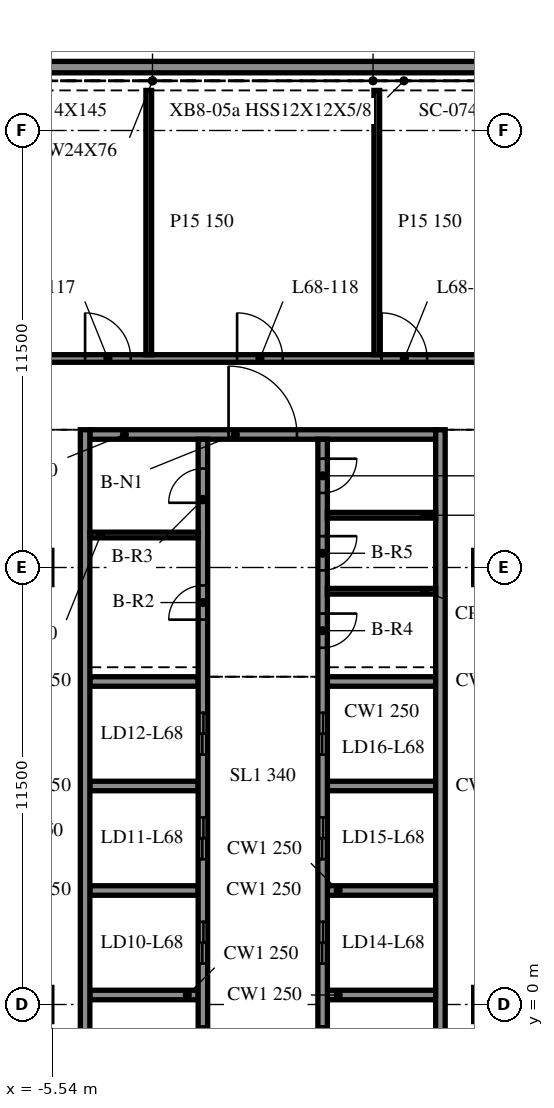
"""IFC4 building model, lengths in metres.
Left out: names, types, materials, properties, quantities, classifications, styles, units other than length and angle.
Written with IfcOpenShell. Run it as: python <this file> out.ifc"""

import sys

from ifc_helpers import new_model, si_unit, direction, frame, frame_2d, origin, place, context, subcontext, project, spatial, rectangle, extrude, element, fill, save


model = new_model("IFC4")
c1 = context("Model", 3, precision=1e-05, world=origin(), true_north=direction((0.0, 1.0)))
c2 = subcontext(c1, "Body", "Model", "MODEL_VIEW")
j1 = project(units=[si_unit("LENGTHUNIT", "METRE"), si_unit("PLANEANGLEUNIT", "RADIAN")], contexts=[c1])
p1 = place(None, origin())
s1 = spatial("IfcSite", under=j1, at=p1, CompositionType="ELEMENT")
p2 = place(p1, origin())
s2 = spatial("IfcBuilding", under=s1, at=p2, CompositionType="ELEMENT")
p3 = place(p2, frame((0.0, 0.0, 278.5)))
s3 = spatial("IfcBuildingStorey", under=s2, at=p3, CompositionType="ELEMENT", Elevation=278.5)
p4 = place(p3, frame((42.0, 24.668, 0.0), z_axis=(0.0, 0.0, 1.0), x_axis=(-1.0, 0.0, 0.0)))
e1 = element("IfcWall", 1, at=p4, inside=s3, PredefinedType="NOTDEFINED", context=c2, shape_type="SweptSolid", body=[
    extrude(rectangle(XDim=84.0, YDim=0.3, at=frame_2d((42.0, 0.0))), origin(), (0.0, 0.0, 1.0), 2.853),
])
for number, where, z_axis, x_axis in (
    (2, (-4.675, 15.125, 0.0), (0.0, 0.0, 1.0), (0.0, -1.0, 0.0)),
    (3, (4.675, -9.125, 0.0), (0.0, 0.0, 1.0), (0.0, 1.0, 0.0)),
):
    element("IfcWall", number, at=place(p3, frame(where, z_axis=z_axis, x_axis=x_axis)), inside=s3, PredefinedType="SOLIDWALL", context=c2, shape_type="SweptSolid", body=[
        extrude(rectangle(XDim=24.25, YDim=0.25, at=frame_2d((12.125, 0.0))), origin(), (0.0, 0.0, 1.0), 3.46),
    ])
p5 = place(p3, frame((-4.55, 15.0, 0.0), z_axis=(0.0, 0.0, 1.0), x_axis=(1.0, 0.0, 0.0)))
e4 = element("IfcWall", 4, at=p5, inside=s3, PredefinedType="SOLIDWALL", context=c2, shape_type="SweptSolid", body=[
    extrude(rectangle(XDim=9.1, YDim=0.25, at=frame_2d((4.55, 0.0))), origin(), (0.0, 0.0, 1.0), 3.46),
])
p6 = place(p5, frame((3.65, 0.0, 0.0)))
e5 = element("IfcOpeningElement", 5, at=p6, cuts=e4, PredefinedType="OPENING", context=c2, shape_type="SweptSolid", body=[
    extrude(rectangle(XDim=1.8, YDim=2.1, at=frame_2d((0.9, 1.05))), frame((0.0, 0.135, 0.0), z_axis=(0.0, -1.0, 0.0), x_axis=(1.0, 0.0, 0.0)), (0.0, 0.0, 1.0), 0.27),
])
p7 = place(p3, frame((-1.575, -8.875, 0.0), z_axis=(0.0, 0.0, 1.0), x_axis=(0.0, 1.0, 0.0)))
e6 = element("IfcWall", 6, at=p7, inside=s3, PredefinedType="SOLIDWALL", context=c2, shape_type="SweptSolid", body=[
    extrude(rectangle(XDim=23.75, YDim=0.25, at=frame_2d((11.875, 0.0))), origin(), (0.0, 0.0, 1.0), 3.46),
])
p8 = place(p7, frame((7.2, 0.0, 0.0)))
e7 = element("IfcOpeningElement", 7, at=p8, cuts=e6, PredefinedType="OPENING", context=c2, shape_type="SweptSolid", body=[
    extrude(rectangle(XDim=1.1, YDim=2.1, at=frame_2d((0.55, 1.05))), frame((0.0, 0.135, 0.0), z_axis=(0.0, -1.0, 0.0), x_axis=(1.0, 0.0, 0.0)), (0.0, 0.0, 1.0), 0.27),
])
p9 = place(p7, frame((9.95, 0.0, 0.0)))
e8 = element("IfcOpeningElement", 8, at=p9, cuts=e6, PredefinedType="OPENING", context=c2, shape_type="SweptSolid", body=[
    extrude(rectangle(XDim=1.1, YDim=2.1, at=frame_2d((0.55, 1.05))), frame((0.0, 0.135, 0.0), z_axis=(0.0, -1.0, 0.0), x_axis=(1.0, 0.0, 0.0)), (0.0, 0.0, 1.0), 0.27),
])
p10 = place(p7, frame((12.7, 0.0, 0.0)))
e9 = element("IfcOpeningElement", 9, at=p10, cuts=e6, PredefinedType="OPENING", context=c2, shape_type="SweptSolid", body=[
    extrude(rectangle(XDim=1.1, YDim=2.1, at=frame_2d((0.55, 1.05))), frame((0.0, 0.135, 0.0), z_axis=(0.0, -1.0, 0.0), x_axis=(1.0, 0.0, 0.0)), (0.0, 0.0, 1.0), 0.27),
])
p11 = place(p7, frame((15.45, 0.0, 0.0)))
e10 = element("IfcOpeningElement", 10, at=p11, cuts=e6, PredefinedType="OPENING", context=c2, shape_type="SweptSolid", body=[
    extrude(rectangle(XDim=1.1, YDim=2.1, at=frame_2d((0.55, 1.05))), frame((0.0, 0.135, 0.0), z_axis=(0.0, -1.0, 0.0), x_axis=(1.0, 0.0, 0.0)), (0.0, 0.0, 1.0), 0.27),
])
p12 = place(p7, frame((2.55, 0.0, 0.0)))
e11 = element("IfcOpeningElement", 11, at=p12, cuts=e6, PredefinedType="OPENING", context=c2, shape_type="SweptSolid", body=[
    extrude(rectangle(XDim=0.9, YDim=2.1, at=frame_2d((0.45, 1.05))), frame((0.0, 0.135, 0.0), z_axis=(0.0, -1.0, 0.0), x_axis=(1.0, 0.0, 0.0)), (0.0, 0.0, 1.0), 0.27),
])
p13 = place(p7, frame((19.002, 0.0, 0.0)))
e12 = element("IfcOpeningElement", 12, at=p13, cuts=e6, PredefinedType="OPENING", context=c2, shape_type="SweptSolid", body=[
    extrude(rectangle(XDim=0.9, YDim=2.1, at=frame_2d((0.45, 1.05))), frame((0.0, 0.135, 0.0), z_axis=(0.0, -1.0, 0.0), x_axis=(1.0, 0.0, 0.0)), (0.0, 0.0, 1.0), 0.27),
])
p14 = place(p7, frame((22.077, 0.0, 0.0)))
e13 = element("IfcOpeningElement", 13, at=p14, cuts=e6, PredefinedType="OPENING", context=c2, shape_type="SweptSolid", body=[
    extrude(rectangle(XDim=0.9, YDim=2.1, at=frame_2d((0.45, 1.05))), frame((0.0, 0.135, 0.0), z_axis=(0.0, -1.0, 0.0), x_axis=(1.0, 0.0, 0.0)), (0.0, 0.0, 1.0), 0.27),
])
p15 = place(p3, frame((1.575, 14.875, 0.0), z_axis=(0.0, 0.0, 1.0), x_axis=(0.0, -1.0, 0.0)))
e14 = element("IfcWall", 14, at=p15, inside=s3, PredefinedType="SOLIDWALL", context=c2, shape_type="SweptSolid", body=[
    extrude(rectangle(XDim=17.5, YDim=0.25, at=frame_2d((8.75, 0.0))), origin(), (0.0, 0.0, 1.0), 3.46),
])
p16 = place(p15, frame((15.45, 0.0, 0.0)))
e15 = element("IfcOpeningElement", 15, at=p16, cuts=e14, PredefinedType="OPENING", context=c2, shape_type="SweptSolid", body=[
    extrude(rectangle(XDim=1.1, YDim=2.1, at=frame_2d((0.55, 1.05))), frame((0.0, 0.135, 0.0), z_axis=(0.0, -1.0, 0.0), x_axis=(1.0, 0.0, 0.0)), (0.0, 0.0, 1.0), 0.27),
])
p17 = place(p15, frame((12.7, 0.0, 0.0)))
e16 = element("IfcOpeningElement", 16, at=p17, cuts=e14, PredefinedType="OPENING", context=c2, shape_type="SweptSolid", body=[
    extrude(rectangle(XDim=1.1, YDim=2.1, at=frame_2d((0.55, 1.05))), frame((0.0, 0.135, 0.0), z_axis=(0.0, -1.0, 0.0), x_axis=(1.0, 0.0, 0.0)), (0.0, 0.0, 1.0), 0.27),
])
p18 = place(p15, frame((9.95, 0.0, 0.0)))
e17 = element("IfcOpeningElement", 17, at=p18, cuts=e14, PredefinedType="OPENING", context=c2, shape_type="SweptSolid", body=[
    extrude(rectangle(XDim=1.1, YDim=2.1, at=frame_2d((0.55, 1.05))), frame((0.0, 0.135, 0.0), z_axis=(0.0, -1.0, 0.0), x_axis=(1.0, 0.0, 0.0)), (0.0, 0.0, 1.0), 0.27),
])
p19 = place(p15, frame((7.2, 0.0, 0.0)))
e18 = element("IfcOpeningElement", 18, at=p19, cuts=e14, PredefinedType="OPENING", context=c2, shape_type="SweptSolid", body=[
    extrude(rectangle(XDim=1.1, YDim=2.1, at=frame_2d((0.55, 1.05))), frame((0.0, 0.135, 0.0), z_axis=(0.0, -1.0, 0.0), x_axis=(1.0, 0.0, 0.0)), (0.0, 0.0, 1.0), 0.27),
])
p20 = place(p15, frame((4.587, 0.0, 0.0)))
e19 = element("IfcOpeningElement", 19, at=p20, cuts=e14, PredefinedType="OPENING", context=c2, shape_type="SweptSolid", body=[
    extrude(rectangle(XDim=0.9, YDim=2.1, at=frame_2d((0.45, 1.05))), frame((0.0, 0.135, 0.0), z_axis=(0.0, -1.0, 0.0), x_axis=(1.0, 0.0, 0.0)), (0.0, 0.0, 1.0), 0.27),
])
p21 = place(p15, frame((2.55, 0.0, 0.0)))
e20 = element("IfcOpeningElement", 20, at=p21, cuts=e14, PredefinedType="OPENING", context=c2, shape_type="SweptSolid", body=[
    extrude(rectangle(XDim=0.9, YDim=2.1, at=frame_2d((0.45, 1.05))), frame((0.0, 0.135, 0.0), z_axis=(0.0, -1.0, 0.0), x_axis=(1.0, 0.0, 0.0)), (0.0, 0.0, 1.0), 0.27),
])
p22 = place(p15, frame((0.512, 0.0, 0.0)))
e21 = element("IfcOpeningElement", 21, at=p22, cuts=e14, PredefinedType="OPENING", context=c2, shape_type="SweptSolid", body=[
    extrude(rectangle(XDim=0.9, YDim=2.1, at=frame_2d((0.45, 1.05))), frame((0.0, 0.135, 0.0), z_axis=(0.0, -1.0, 0.0), x_axis=(1.0, 0.0, 0.0)), (0.0, 0.0, 1.0), 0.27),
])
for number, where, z_axis, x_axis in (
    (22, (-4.55, 0.25, 0.0), (0.0, 0.0, 1.0), (1.0, 0.0, 0.0)),
    (23, (-4.55, 3.0, 0.0), (0.0, 0.0, 1.0), (1.0, 0.0, 0.0)),
    (24, (-4.55, 5.75, 0.0), (0.0, 0.0, 1.0), (1.0, 0.0, 0.0)),
    (25, (-4.55, 8.5, 0.0), (0.0, 0.0, 1.0), (1.0, 0.0, 0.0)),
    (26, (1.7, 0.25, 0.0), (0.0, 0.0, 1.0), (1.0, 0.0, 0.0)),
    (27, (1.7, 3.0, 0.0), (0.0, 0.0, 1.0), (1.0, 0.0, 0.0)),
    (28, (1.7, 5.75, 0.0), (0.0, 0.0, 1.0), (1.0, 0.0, 0.0)),
    (29, (1.7, 8.5, 0.0), (0.0, 0.0, 1.0), (1.0, 0.0, 0.0)),
):
    element("IfcWall", number, at=place(p3, frame(where, z_axis=z_axis, x_axis=x_axis)), inside=s3, PredefinedType="SOLIDWALL", context=c2, shape_type="SweptSolid", body=[
        extrude(rectangle(XDim=2.85, YDim=0.25, at=frame_2d((1.425, 0.0))), origin(), (0.0, 0.0, 1.0), 3.46),
    ])
for number, where, z_axis, x_axis in (
    (30, (-4.55, 12.355, 0.0), (0.0, 0.0, 1.0), (1.0, 0.0, 0.0)),
    (31, (1.7, 10.875, 0.0), (0.0, 0.0, 1.0), (1.0, 0.0, 0.0)),
    (32, (1.7, 12.875, 0.0), (0.0, 0.0, 1.0), (1.0, 0.0, 0.0)),
):
    element("IfcWall", number, at=place(p3, frame(where, z_axis=z_axis, x_axis=x_axis)), inside=s3, PredefinedType="PARTITIONING", context=c2, shape_type="SweptSolid", body=[
        extrude(rectangle(XDim=2.85, YDim=0.15, at=frame_2d((1.425, 0.0))), origin(), (0.0, 0.0, 1.0), 3.46),
    ])
p23 = place(p3, frame((-47.975, 17.0, 0.0), z_axis=(0.0, 0.0, 1.0), x_axis=(1.0, 0.0, 0.0)))
e33 = element("IfcWall", 33, at=p23, inside=s3, PredefinedType="PARTITIONING", context=c2, shape_type="SweptSolid", body=[
    extrude(rectangle(XDim=95.95, YDim=0.2, at=frame_2d((47.975, 0.0))), origin(), (0.0, 0.0, 1.0), 3.46),
])
p24 = place(p23, frame((7.3, 0.0, 0.0)))
e34 = element("IfcOpeningElement", 34, at=p24, cuts=e33, PredefinedType="OPENING", context=c2, shape_type="SweptSolid", body=[
    extrude(rectangle(XDim=1.2, YDim=2.1, at=frame_2d((0.6, 1.05))), frame((0.0, 0.11, 0.0), z_axis=(0.0, -1.0, 0.0), x_axis=(1.0, 0.0, 0.0)), (0.0, 0.0, 1.0), 0.22),
])
p25 = place(p23, frame((13.3, 0.0, 0.0)))
e35 = element("IfcOpeningElement", 35, at=p25, cuts=e33, PredefinedType="OPENING", context=c2, shape_type="SweptSolid", body=[
    extrude(rectangle(XDim=1.2, YDim=2.1, at=frame_2d((0.6, 1.05))), frame((0.0, 0.11, 0.0), z_axis=(0.0, -1.0, 0.0), x_axis=(1.0, 0.0, 0.0)), (0.0, 0.0, 1.0), 0.22),
])
p26 = place(p23, frame((19.3, 0.0, 0.0)))
e36 = element("IfcOpeningElement", 36, at=p26, cuts=e33, PredefinedType="OPENING", context=c2, shape_type="SweptSolid", body=[
    extrude(rectangle(XDim=1.2, YDim=2.1, at=frame_2d((0.6, 1.05))), frame((0.0, 0.11, 0.0), z_axis=(0.0, -1.0, 0.0), x_axis=(1.0, 0.0, 0.0)), (0.0, 0.0, 1.0), 0.22),
])
p27 = place(p23, frame((28.5, 0.0, 0.0)))
e37 = element("IfcOpeningElement", 37, at=p27, cuts=e33, PredefinedType="OPENING", context=c2, shape_type="SweptSolid", body=[
    extrude(rectangle(XDim=1.0, YDim=2.1, at=frame_2d((0.5, 1.05))), frame((0.0, 0.11, 0.0), z_axis=(0.0, -1.0, 0.0), x_axis=(1.0, 0.0, 0.0)), (0.0, 0.0, 1.0), 0.22),
])
p28 = place(p23, frame((31.3, 0.0, 0.0)))
e38 = element("IfcOpeningElement", 38, at=p28, cuts=e33, PredefinedType="OPENING", context=c2, shape_type="SweptSolid", body=[
    extrude(rectangle(XDim=1.2, YDim=2.1, at=frame_2d((0.6, 1.05))), frame((0.0, 0.11, 0.0), z_axis=(0.0, -1.0, 0.0), x_axis=(1.0, 0.0, 0.0)), (0.0, 0.0, 1.0), 0.22),
])
p29 = place(p23, frame((37.5, 0.0, 0.0)))
e39 = element("IfcOpeningElement", 39, at=p29, cuts=e33, PredefinedType="OPENING", context=c2, shape_type="SweptSolid", body=[
    extrude(rectangle(XDim=1.0, YDim=2.1, at=frame_2d((0.5, 1.05))), frame((0.0, 0.11, 0.0), z_axis=(0.0, -1.0, 0.0), x_axis=(1.0, 0.0, 0.0)), (0.0, 0.0, 1.0), 0.22),
])
p30 = place(p23, frame((43.3, 0.0, 0.0)))
e40 = element("IfcOpeningElement", 40, at=p30, cuts=e33, PredefinedType="OPENING", context=c2, shape_type="SweptSolid", body=[
    extrude(rectangle(XDim=1.2, YDim=2.1, at=frame_2d((0.6, 1.05))), frame((0.0, 0.11, 0.0), z_axis=(0.0, -1.0, 0.0), x_axis=(1.0, 0.0, 0.0)), (0.0, 0.0, 1.0), 0.22),
])
p31 = place(p23, frame((47.3, 0.0, 0.0)))
e41 = element("IfcOpeningElement", 41, at=p31, cuts=e33, PredefinedType="OPENING", context=c2, shape_type="SweptSolid", body=[
    extrude(rectangle(XDim=1.2, YDim=2.1, at=frame_2d((0.6, 1.05))), frame((0.0, 0.11, 0.0), z_axis=(0.0, -1.0, 0.0), x_axis=(1.0, 0.0, 0.0)), (0.0, 0.0, 1.0), 0.22),
])
p32 = place(p23, frame((51.1, 0.0, 0.0)))
e42 = element("IfcOpeningElement", 42, at=p32, cuts=e33, PredefinedType="OPENING", context=c2, shape_type="SweptSolid", body=[
    extrude(rectangle(XDim=1.2, YDim=2.1, at=frame_2d((0.6, 1.05))), frame((0.0, 0.11, 0.0), z_axis=(0.0, -1.0, 0.0), x_axis=(1.0, 0.0, 0.0)), (0.0, 0.0, 1.0), 0.22),
])
p33 = place(p23, frame((60.1, 0.0, 0.0)))
e43 = element("IfcOpeningElement", 43, at=p33, cuts=e33, PredefinedType="OPENING", context=c2, shape_type="SweptSolid", body=[
    extrude(rectangle(XDim=1.0, YDim=2.1, at=frame_2d((0.5, 1.05))), frame((0.0, 0.11, 0.0), z_axis=(0.0, -1.0, 0.0), x_axis=(1.0, 0.0, 0.0)), (0.0, 0.0, 1.0), 0.22),
])
p34 = place(p23, frame((63.1, 0.0, 0.0)))
e44 = element("IfcOpeningElement", 44, at=p34, cuts=e33, PredefinedType="OPENING", context=c2, shape_type="SweptSolid", body=[
    extrude(rectangle(XDim=1.2, YDim=2.1, at=frame_2d((0.6, 1.05))), frame((0.0, 0.11, 0.0), z_axis=(0.0, -1.0, 0.0), x_axis=(1.0, 0.0, 0.0)), (0.0, 0.0, 1.0), 0.22),
])
p35 = place(p23, frame((69.1, 0.0, 0.0)))
e45 = element("IfcOpeningElement", 45, at=p35, cuts=e33, PredefinedType="OPENING", context=c2, shape_type="SweptSolid", body=[
    extrude(rectangle(XDim=1.0, YDim=2.1, at=frame_2d((0.5, 1.05))), frame((0.0, 0.11, 0.0), z_axis=(0.0, -1.0, 0.0), x_axis=(1.0, 0.0, 0.0)), (0.0, 0.0, 1.0), 0.22),
])
p36 = place(p23, frame((75.1, 0.0, 0.0)))
e46 = element("IfcOpeningElement", 46, at=p36, cuts=e33, PredefinedType="OPENING", context=c2, shape_type="SweptSolid", body=[
    extrude(rectangle(XDim=1.2, YDim=2.1, at=frame_2d((0.6, 1.05))), frame((0.0, 0.11, 0.0), z_axis=(0.0, -1.0, 0.0), x_axis=(1.0, 0.0, 0.0)), (0.0, 0.0, 1.0), 0.22),
])
p37 = place(p23, frame((81.1, 0.0, 0.0)))
e47 = element("IfcOpeningElement", 47, at=p37, cuts=e33, PredefinedType="OPENING", context=c2, shape_type="SweptSolid", body=[
    extrude(rectangle(XDim=1.2, YDim=2.1, at=frame_2d((0.6, 1.05))), frame((0.0, 0.11, 0.0), z_axis=(0.0, -1.0, 0.0), x_axis=(1.0, 0.0, 0.0)), (0.0, 0.0, 1.0), 0.22),
])
p38 = place(p23, frame((90.1, 0.0, 0.0)))
e48 = element("IfcOpeningElement", 48, at=p38, cuts=e33, PredefinedType="OPENING", context=c2, shape_type="SweptSolid", body=[
    extrude(rectangle(XDim=1.2, YDim=2.1, at=frame_2d((0.6, 1.05))), frame((0.0, 0.11, 0.0), z_axis=(0.0, -1.0, 0.0), x_axis=(1.0, 0.0, 0.0)), (0.0, 0.0, 1.0), 0.22),
])
for number, where, z_axis, x_axis in (
    (49, (-3.0, 17.1, 0.0), (0.0, 0.0, 1.0), (0.0, 1.0, 0.0)),
    (50, (3.0, 17.1, 0.0), (0.0, 0.0, 1.0), (0.0, 1.0, 0.0)),
):
    element("IfcWall", number, at=place(p3, frame(where, z_axis=z_axis, x_axis=x_axis)), inside=s3, PredefinedType="PARTITIONING", context=c2, shape_type="SweptSolid", body=[
        extrude(rectangle(XDim=6.955, YDim=0.15, at=frame_2d((3.477, 0.0))), origin(), (0.0, 0.0, 1.0), 3.46),
    ])
p39 = place(p6, origin())
e51 = element("IfcDoor", 51, at=p39, inside=s3, OperationType="DOUBLE_DOOR_SINGLE_SWING", PredefinedType="DOOR", context=c2, shape_type="SweptSolid", body=[
    extrude(rectangle(XDim=1.8, YDim=2.1, at=frame_2d((0.9, 1.05))), frame((0.0, 0.025, 0.0), z_axis=(0.0, -1.0, 0.0), x_axis=(1.0, 0.0, 0.0)), (0.0, 0.0, 1.0), 0.05),
])
fill(e5, e51)
p40 = place(p16, origin())
e52 = element("IfcDoor", 52, at=p40, inside=s3, OperationType="DOUBLE_DOOR_SLIDING", PredefinedType="DOOR", context=c2, shape_type="SweptSolid", body=[
    extrude(rectangle(XDim=1.1, YDim=2.1, at=frame_2d((0.55, 1.05))), frame((0.0, 0.025, 0.0), z_axis=(0.0, -1.0, 0.0), x_axis=(1.0, 0.0, 0.0)), (0.0, 0.0, 1.0), 0.05),
])
fill(e15, e52)
p41 = place(p17, origin())
e53 = element("IfcDoor", 53, at=p41, inside=s3, OperationType="DOUBLE_DOOR_SLIDING", PredefinedType="DOOR", context=c2, shape_type="SweptSolid", body=[
    extrude(rectangle(XDim=1.1, YDim=2.1, at=frame_2d((0.55, 1.05))), frame((0.0, 0.025, 0.0), z_axis=(0.0, -1.0, 0.0), x_axis=(1.0, 0.0, 0.0)), (0.0, 0.0, 1.0), 0.05),
])
fill(e16, e53)
p42 = place(p18, origin())
e54 = element("IfcDoor", 54, at=p42, inside=s3, OperationType="DOUBLE_DOOR_SLIDING", PredefinedType="DOOR", context=c2, shape_type="SweptSolid", body=[
    extrude(rectangle(XDim=1.1, YDim=2.1, at=frame_2d((0.55, 1.05))), frame((0.0, 0.025, 0.0), z_axis=(0.0, -1.0, 0.0), x_axis=(1.0, 0.0, 0.0)), (0.0, 0.0, 1.0), 0.05),
])
fill(e17, e54)
p43 = place(p19, origin())
e55 = element("IfcDoor", 55, at=p43, inside=s3, OperationType="DOUBLE_DOOR_SLIDING", PredefinedType="DOOR", context=c2, shape_type="SweptSolid", body=[
    extrude(rectangle(XDim=1.1, YDim=2.1, at=frame_2d((0.55, 1.05))), frame((0.0, 0.025, 0.0), z_axis=(0.0, -1.0, 0.0), x_axis=(1.0, 0.0, 0.0)), (0.0, 0.0, 1.0), 0.05),
])
fill(e18, e55)
p44 = place(p8, origin())
e56 = element("IfcDoor", 56, at=p44, inside=s3, OperationType="DOUBLE_DOOR_SLIDING", PredefinedType="DOOR", context=c2, shape_type="SweptSolid", body=[
    extrude(rectangle(XDim=1.1, YDim=2.1, at=frame_2d((0.55, 1.05))), frame((0.0, 0.025, 0.0), z_axis=(0.0, -1.0, 0.0), x_axis=(1.0, 0.0, 0.0)), (0.0, 0.0, 1.0), 0.05),
])
fill(e7, e56)
p45 = place(p9, origin())
e57 = element("IfcDoor", 57, at=p45, inside=s3, OperationType="DOUBLE_DOOR_SLIDING", PredefinedType="DOOR", context=c2, shape_type="SweptSolid", body=[
    extrude(rectangle(XDim=1.1, YDim=2.1, at=frame_2d((0.55, 1.05))), frame((0.0, 0.025, 0.0), z_axis=(0.0, -1.0, 0.0), x_axis=(1.0, 0.0, 0.0)), (0.0, 0.0, 1.0), 0.05),
])
fill(e8, e57)
p46 = place(p10, origin())
e58 = element("IfcDoor", 58, at=p46, inside=s3, OperationType="DOUBLE_DOOR_SLIDING", PredefinedType="DOOR", context=c2, shape_type="SweptSolid", body=[
    extrude(rectangle(XDim=1.1, YDim=2.1, at=frame_2d((0.55, 1.05))), frame((0.0, 0.025, 0.0), z_axis=(0.0, -1.0, 0.0), x_axis=(1.0, 0.0, 0.0)), (0.0, 0.0, 1.0), 0.05),
])
fill(e9, e58)
p47 = place(p11, origin())
e59 = element("IfcDoor", 59, at=p47, inside=s3, OperationType="DOUBLE_DOOR_SLIDING", PredefinedType="DOOR", context=c2, shape_type="SweptSolid", body=[
    extrude(rectangle(XDim=1.1, YDim=2.1, at=frame_2d((0.55, 1.05))), frame((0.0, 0.025, 0.0), z_axis=(0.0, -1.0, 0.0), x_axis=(1.0, 0.0, 0.0)), (0.0, 0.0, 1.0), 0.05),
])
fill(e10, e59)
p48 = place(p13, origin())
e60 = element("IfcDoor", 60, at=p48, inside=s3, OperationType="SINGLE_SWING_RIGHT", PredefinedType="DOOR", context=c2, shape_type="SweptSolid", body=[
    extrude(rectangle(XDim=0.9, YDim=2.1, at=frame_2d((0.45, 1.05))), frame((0.0, 0.025, 0.0), z_axis=(0.0, -1.0, 0.0), x_axis=(1.0, 0.0, 0.0)), (0.0, 0.0, 1.0), 0.05),
])
fill(e12, e60)
p49 = place(p14, origin())
e61 = element("IfcDoor", 61, at=p49, inside=s3, OperationType="SINGLE_SWING_LEFT", PredefinedType="DOOR", context=c2, shape_type="SweptSolid", body=[
    extrude(rectangle(XDim=0.9, YDim=2.1, at=frame_2d((0.45, 1.05))), frame((0.0, 0.025, 0.0), z_axis=(0.0, -1.0, 0.0), x_axis=(1.0, 0.0, 0.0)), (0.0, 0.0, 1.0), 0.05),
])
fill(e13, e61)
p50 = place(p20, origin())
e62 = element("IfcDoor", 62, at=p50, inside=s3, OperationType="SINGLE_SWING_RIGHT", PredefinedType="DOOR", context=c2, shape_type="SweptSolid", body=[
    extrude(rectangle(XDim=0.9, YDim=2.1, at=frame_2d((0.45, 1.05))), frame((0.0, 0.025, 0.0), z_axis=(0.0, -1.0, 0.0), x_axis=(1.0, 0.0, 0.0)), (0.0, 0.0, 1.0), 0.05),
])
fill(e19, e62)
p51 = place(p21, origin())
e63 = element("IfcDoor", 63, at=p51, inside=s3, OperationType="SINGLE_SWING_LEFT", PredefinedType="DOOR", context=c2, shape_type="SweptSolid", body=[
    extrude(rectangle(XDim=0.9, YDim=2.1, at=frame_2d((0.45, 1.05))), frame((0.0, 0.025, 0.0), z_axis=(0.0, -1.0, 0.0), x_axis=(1.0, 0.0, 0.0)), (0.0, 0.0, 1.0), 0.05),
])
fill(e20, e63)
p52 = place(p22, origin())
e64 = element("IfcDoor", 64, at=p52, inside=s3, OperationType="SINGLE_SWING_RIGHT", PredefinedType="DOOR", context=c2, shape_type="SweptSolid", body=[
    extrude(rectangle(XDim=0.9, YDim=2.1, at=frame_2d((0.45, 1.05))), frame((0.0, 0.025, 0.0), z_axis=(0.0, -1.0, 0.0), x_axis=(1.0, 0.0, 0.0)), (0.0, 0.0, 1.0), 0.05),
])
fill(e21, e64)
p53 = place(p30, origin())
e65 = element("IfcDoor", 65, at=p53, inside=s3, OperationType="SINGLE_SWING_LEFT", PredefinedType="DOOR", context=c2, shape_type="SweptSolid", body=[
    extrude(rectangle(XDim=1.2, YDim=2.1, at=frame_2d((0.6, 1.05))), frame((0.0, 0.025, 0.0), z_axis=(0.0, -1.0, 0.0), x_axis=(1.0, 0.0, 0.0)), (0.0, 0.0, 1.0), 0.05),
])
fill(e40, e65)
p54 = place(p31, origin())
e66 = element("IfcDoor", 66, at=p54, inside=s3, OperationType="SINGLE_SWING_RIGHT", PredefinedType="DOOR", context=c2, shape_type="SweptSolid", body=[
    extrude(rectangle(XDim=1.2, YDim=2.1, at=frame_2d((0.6, 1.05))), frame((0.0, 0.025, 0.0), z_axis=(0.0, -1.0, 0.0), x_axis=(1.0, 0.0, 0.0)), (0.0, 0.0, 1.0), 0.05),
])
fill(e41, e66)
p55 = place(p32, origin())
e67 = element("IfcDoor", 67, at=p55, inside=s3, OperationType="SINGLE_SWING_RIGHT", PredefinedType="DOOR", context=c2, shape_type="SweptSolid", body=[
    extrude(rectangle(XDim=1.2, YDim=2.1, at=frame_2d((0.6, 1.05))), frame((0.0, 0.025, 0.0), z_axis=(0.0, -1.0, 0.0), x_axis=(1.0, 0.0, 0.0)), (0.0, 0.0, 1.0), 0.05),
])
fill(e42, e67)
save(model, sys.argv[1])
